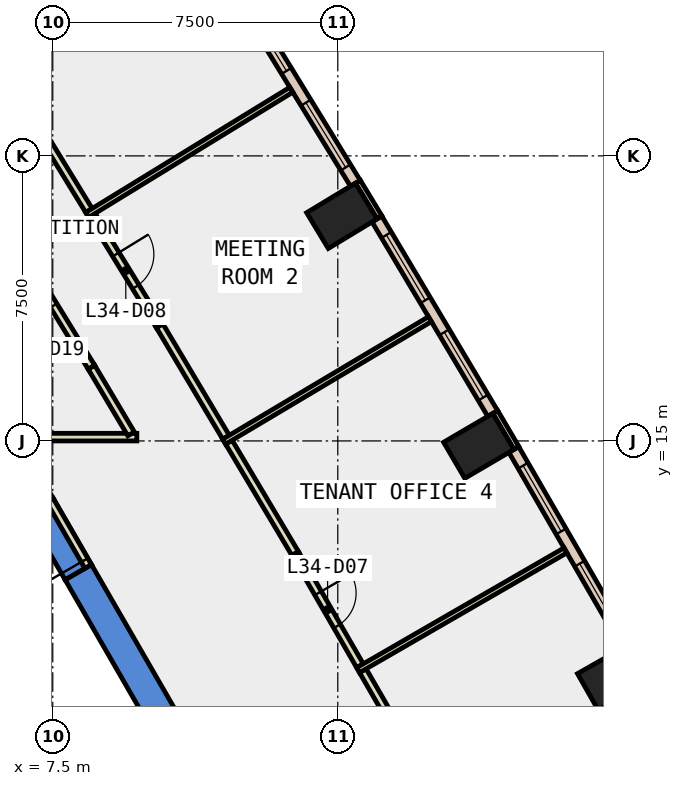
"""IFC4 building model, lengths in metres.
Left out: names, types, materials, properties, quantities, classifications, styles, units other than length and angle.
Written with IfcOpenShell. Run it as: python <this file> out.ifc"""

import sys

from ifc_helpers import new_model, si_unit, direction, frame, frame_2d, origin, origin_2d, place, context, subcontext, project, spatial, polyline, rectangle, outline, extrude, element, fill, save


model = new_model("IFC4")
c1 = context("Model", 3, precision=1e-05, world=origin(), true_north=direction((0.0, 1.0)))
c2 = subcontext(c1, "Body", "Model", "MODEL_VIEW")
j1 = project(units=[si_unit("LENGTHUNIT", "METRE"), si_unit("PLANEANGLEUNIT", "RADIAN")], contexts=[c1])
p1 = place(None, origin())
s1 = spatial("IfcSite", under=j1, at=p1, CompositionType="ELEMENT")
p2 = place(p1, origin())
s2 = spatial("IfcBuilding", under=s1, at=p2, CompositionType="ELEMENT")
p3 = place(p2, frame((0.0, 0.0, 155.0)))
s3 = spatial("IfcBuildingStorey", under=s2, at=p3, CompositionType="ELEMENT", Elevation=155.0)
for number, where, z_axis, x_axis in (
    (1, (22.232, 8.769, -0.4), (0.0, 0.0, 1.0), (-0.494, 0.869, 0.0)),
    (2, (18.71, 14.87, -0.4), (0.0, 0.0, 1.0), (-0.506, 0.863, 0.0)),
    (3, (15.107, 20.923, -0.4), (0.0, 0.0, 1.0), (-0.518, 0.855, 0.0)),
):
    element("IfcColumn", number, at=place(p3, frame(where, z_axis=z_axis, x_axis=x_axis)), inside=s3, PredefinedType="COLUMN", context=c2, shape_type="SweptSolid", body=[
        extrude(rectangle(XDim=1.1, YDim=1.5, at=origin_2d()), origin(), (0.0, 0.0, 1.0), 4.2),
    ])
p4 = place(p3, frame((0.0, 0.0, -0.4)))
e4 = element("IfcWall", 4, at=p4, inside=s3, PredefinedType="SHEAR", context=c2, shape_type="SweptSolid", body=[
    extrude(outline(polyline([(8.517, 11.748), (7.824, 11.348), (12.933, 2.5), (13.856, 2.5), (8.517, 11.748)])), origin(), (0.0, 0.0, 1.0), 4.2),
])
p5 = place(p3, frame((0.0, 0.0, -0.4)))
e5 = element("IfcWall", 5, at=p5, inside=s3, PredefinedType="SHEAR", context=c2, shape_type="SweptSolid", body=[
    extrude(outline(polyline([(6.824, 13.08), (7.517, 13.48), (6.928, 14.5), (6.466, 13.7), (6.824, 13.08)])), origin(), (0.0, 0.0, 1.0), 4.2),
])
p6 = place(p3, frame((0.0, 0.0, 3.6)))
e6 = element("IfcWall", 6, at=p6, inside=s3, PredefinedType="SHEAR", context=c2, shape_type="SweptSolid", body=[
    extrude(outline(polyline([(7.517, 13.48), (6.824, 13.08), (7.824, 11.348), (8.517, 11.748), (7.517, 13.48)])), origin(), (0.0, 0.0, 1.0), 0.2),
])
p7 = place(p3, frame((19.7, 14.813, 0.0), z_axis=(0.0, 0.0, 1.0), x_axis=(-0.506505715302, 0.862236603472, 0.0)))
e7 = element("IfcWall", 7, at=p7, inside=s3, PredefinedType="STANDARD", context=c2, shape_type="SweptSolid", body=[
    extrude(rectangle(XDim=1.099, YDim=0.15, at=frame_2d((0.55, 0.0))), origin(), (0.0, 0.0, 1.0), 3.8),
])
p8 = place(p3, frame((16.098, 20.88, 0.0), z_axis=(0.0, 0.0, 1.0), x_axis=(-0.517918067967, 0.85543022794, 0.0)))
e8 = element("IfcWall", 8, at=p8, inside=s3, PredefinedType="STANDARD", context=c2, shape_type="SweptSolid", body=[
    extrude(rectangle(XDim=1.1, YDim=0.15, at=frame_2d((0.55, 0.0))), origin(), (0.0, 0.0, 1.0), 3.8),
])
p9 = place(p3, frame((22.61, 9.615, 0.0), z_axis=(0.0, 0.0, 1.0), x_axis=(-0.500061823953, 0.865989706766, 0.0)))
e9 = element("IfcWall", 9, at=p9, inside=s3, PredefinedType="STANDARD", context=c2, shape_type="SweptSolid", body=[
    extrude(rectangle(XDim=5.957, YDim=0.3, at=frame_2d((2.979, 0.0))), origin(), (0.0, 0.0, 1.0), 3.8),
])
p10 = place(p9, frame((0.489, 0.0, 0.9)))
e10 = element("IfcOpeningElement", 10, at=p10, cuts=e9, PredefinedType="OPENING", context=c2, shape_type="SweptSolid", body=[
    extrude(rectangle(XDim=2.0, YDim=2.6, at=frame_2d((1.0, 1.3))), frame((0.0, 0.16, 0.0), z_axis=(0.0, -1.0, 0.0), x_axis=(1.0, 0.0, 0.0)), (0.0, 0.0, 1.0), 0.32),
])
p11 = place(p9, frame((3.468, 0.0, 0.9)))
e11 = element("IfcOpeningElement", 11, at=p11, cuts=e9, PredefinedType="OPENING", context=c2, shape_type="SweptSolid", body=[
    extrude(rectangle(XDim=2.0, YDim=2.6, at=frame_2d((1.0, 1.3))), frame((0.0, 0.16, 0.0), z_axis=(0.0, -1.0, 0.0), x_axis=(1.0, 0.0, 0.0)), (0.0, 0.0, 1.0), 0.32),
])
p12 = place(p3, frame((19.076, 15.721, 0.0), z_axis=(0.0, 0.0, 1.0), x_axis=(-0.511455040009, 0.859310038374, 0.0)))
e12 = element("IfcWall", 12, at=p12, inside=s3, PredefinedType="STANDARD", context=c2, shape_type="SweptSolid", body=[
    extrude(rectangle(XDim=5.957, YDim=0.3, at=frame_2d((2.979, 0.0))), origin(), (0.0, 0.0, 1.0), 3.8),
])
p13 = place(p12, frame((0.489, 0.0, 0.9)))
e13 = element("IfcOpeningElement", 13, at=p13, cuts=e12, PredefinedType="OPENING", context=c2, shape_type="SweptSolid", body=[
    extrude(rectangle(XDim=2.0, YDim=2.6, at=frame_2d((1.0, 1.3))), frame((0.0, 0.16, 0.0), z_axis=(0.0, -1.0, 0.0), x_axis=(1.0, 0.0, 0.0)), (0.0, 0.0, 1.0), 0.32),
])
p14 = place(p12, frame((3.468, 0.0, 0.9)))
e14 = element("IfcOpeningElement", 14, at=p14, cuts=e12, PredefinedType="OPENING", context=c2, shape_type="SweptSolid", body=[
    extrude(rectangle(XDim=2.0, YDim=2.6, at=frame_2d((1.0, 1.3))), frame((0.0, 0.16, 0.0), z_axis=(0.0, -1.0, 0.0), x_axis=(1.0, 0.0, 0.0)), (0.0, 0.0, 1.0), 0.32),
])
p15 = place(p3, frame((15.462, 21.779, 0.0), z_axis=(0.0, 0.0, 1.0), x_axis=(-0.522704272908, 0.852514072074, 0.0)))
e15 = element("IfcWall", 15, at=p15, inside=s3, PredefinedType="STANDARD", context=c2, shape_type="SweptSolid", body=[
    extrude(rectangle(XDim=5.958, YDim=0.3, at=frame_2d((2.979, 0.0))), origin(), (0.0, 0.0, 1.0), 3.8),
])
p16 = place(p15, frame((0.489, 0.0, 0.9)))
e16 = element("IfcOpeningElement", 16, at=p16, cuts=e15, PredefinedType="OPENING", context=c2, shape_type="SweptSolid", body=[
    extrude(rectangle(XDim=2.0, YDim=2.6, at=frame_2d((1.0, 1.3))), frame((0.0, 0.16, 0.0), z_axis=(0.0, -1.0, 0.0), x_axis=(1.0, 0.0, 0.0)), (0.0, 0.0, 1.0), 0.32),
])
p17 = place(p15, frame((3.468, 0.0, 0.9)))
e17 = element("IfcOpeningElement", 17, at=p17, cuts=e15, PredefinedType="OPENING", context=c2, shape_type="SweptSolid", body=[
    extrude(rectangle(XDim=2.0, YDim=2.6, at=frame_2d((1.0, 1.3))), frame((0.0, 0.16, 0.0), z_axis=(0.0, -1.0, 0.0), x_axis=(1.0, 0.0, 0.0)), (0.0, 0.0, 1.0), 0.32),
])
p18 = place(p3, frame((6.484, 15.1, 0.0), z_axis=(0.0, 0.0, 1.0), x_axis=(1.0, 0.0, 0.0)))
e18 = element("IfcWall", 18, at=p18, inside=s3, PredefinedType="PARTITIONING", context=c2, shape_type="SweptSolid", body=[
    extrude(rectangle(XDim=3.228, YDim=0.2, at=frame_2d((1.614, 0.0))), origin(), (0.0, 0.0, 1.0), 3.8),
])
p19 = place(p3, frame((9.561, 15.186, 0.0), z_axis=(0.0, 0.0, 1.0), x_axis=(-0.511399832047, 0.859342895346, 0.0)))
e19 = element("IfcWall", 19, at=p19, inside=s3, PredefinedType="PARTITIONING", context=c2, shape_type="SweptSolid", body=[
    extrude(rectangle(XDim=2.043, YDim=0.2, at=frame_2d((1.021, 0.0))), origin(), (0.0, 0.0, 1.0), 3.8),
])
p20 = place(p3, frame((8.516, 16.942, 0.0), z_axis=(0.0, 0.0, 1.0), x_axis=(-0.522865983217, 0.852414901086, 0.0)))
e20 = element("IfcWall", 20, at=p20, inside=s3, PredefinedType="PARTITIONING", context=c2, shape_type="SweptSolid", body=[
    extrude(rectangle(XDim=4.803, YDim=0.2, at=frame_2d((2.401, 0.0))), origin(), (0.0, 0.0, 1.0), 3.8),
])
p21 = place(p20, frame((1.901, 0.0, 0.0)))
e21 = element("IfcOpeningElement", 21, at=p21, cuts=e20, PredefinedType="OPENING", context=c2, shape_type="SweptSolid", body=[
    extrude(rectangle(XDim=1.0, YDim=2.1, at=frame_2d((0.5, 1.05))), frame((0.0, 0.11, 0.0), z_axis=(0.0, -1.0, 0.0), x_axis=(1.0, 0.0, 0.0)), (0.0, 0.0, 1.0), 0.22),
])
p22 = place(p3, frame((15.659, 8.954, 0.0), z_axis=(0.0, 0.0, 1.0), x_axis=(0.50001992892, -0.866013897511, 0.0)))
e22 = element("IfcWall", 22, at=p22, inside=s3, PredefinedType="PARTITIONING", context=c2, shape_type="SweptSolid", body=[
    extrude(rectangle(XDim=3.41, YDim=0.2, at=frame_2d((1.705, 0.0))), origin(), (0.0, 0.0, 1.0), 3.8),
])
p23 = place(p3, frame((12.134, 14.968, 0.0), z_axis=(0.0, 0.0, 1.0), x_axis=(0.511545516492, -0.859256180983, 0.0)))
e23 = element("IfcWall", 23, at=p23, inside=s3, PredefinedType="PARTITIONING", context=c2, shape_type="SweptSolid", body=[
    extrude(rectangle(XDim=3.411, YDim=0.2, at=frame_2d((1.706, 0.0))), origin(), (0.0, 0.0, 1.0), 3.8),
])
p24 = place(p3, frame((13.879, 12.037, 0.0), z_axis=(0.0, 0.0, 1.0), x_axis=(0.50001992892, -0.866013897511, 0.0)))
e24 = element("IfcWall", 24, at=p24, inside=s3, PredefinedType="PARTITIONING", context=c2, shape_type="SweptSolid", body=[
    extrude(rectangle(XDim=3.41, YDim=0.2, at=frame_2d((1.705, 0.0))), origin(), (0.0, 0.0, 1.0), 3.8),
])
p25 = place(p24, frame((1.205, 0.0, 0.0)))
e25 = element("IfcOpeningElement", 25, at=p25, cuts=e24, PredefinedType="OPENING", context=c2, shape_type="SweptSolid", body=[
    extrude(rectangle(XDim=1.0, YDim=2.1, at=frame_2d((0.5, 1.05))), frame((0.0, 0.11, 0.0), z_axis=(0.0, -1.0, 0.0), x_axis=(1.0, 0.0, 0.0)), (0.0, 0.0, 1.0), 0.22),
])
p26 = place(p3, frame((8.53, 20.935, 0.0), z_axis=(0.0, 0.0, 1.0), x_axis=(0.522830634433, -0.852436582801, 0.0)))
e26 = element("IfcWall", 26, at=p26, inside=s3, PredefinedType="PARTITIONING", context=c2, shape_type="SweptSolid", body=[
    extrude(rectangle(XDim=3.41, YDim=0.2, at=frame_2d((1.705, 0.0))), origin(), (0.0, 0.0, 1.0), 3.8),
])
p27 = place(p26, frame((1.205, 0.0, 0.0)))
e27 = element("IfcOpeningElement", 27, at=p27, cuts=e26, PredefinedType="OPENING", context=c2, shape_type="SweptSolid", body=[
    extrude(rectangle(XDim=1.0, YDim=2.1, at=frame_2d((0.5, 1.05))), frame((0.0, 0.11, 0.0), z_axis=(0.0, -1.0, 0.0), x_axis=(1.0, 0.0, 0.0)), (0.0, 0.0, 1.0), 0.22),
])
p28 = place(p3, frame((10.313, 18.028, 0.0), z_axis=(0.0, 0.0, 1.0), x_axis=(0.511566898838, -0.859243450958, 0.0)))
e28 = element("IfcWall", 28, at=p28, inside=s3, PredefinedType="PARTITIONING", context=c2, shape_type="SweptSolid", body=[
    extrude(rectangle(XDim=3.411, YDim=0.2, at=frame_2d((1.706, 0.0))), origin(), (0.0, 0.0, 1.0), 3.8),
])
p29 = place(p3, frame((6.67, 23.97, 0.0), z_axis=(0.0, 0.0, 1.0), x_axis=(0.522622501212, -0.85256420358, 0.0)))
e29 = element("IfcWall", 29, at=p29, inside=s3, PredefinedType="PARTITIONING", context=c2, shape_type="SweptSolid", body=[
    extrude(rectangle(XDim=3.41, YDim=0.2, at=frame_2d((1.705, 0.0))), origin(), (0.0, 0.0, 1.0), 3.8),
])
p30 = place(p3, frame((15.535, 8.969, 0.0), z_axis=(0.0, 0.0, 1.0), x_axis=(0.865951968193, 0.500127172609, 0.0)))
e30 = element("IfcWall", 30, at=p30, inside=s3, PredefinedType="PARTITIONING", context=c2, shape_type="SweptSolid", body=[
    extrude(rectangle(XDim=6.301, YDim=0.15, at=frame_2d((3.15, 0.0))), origin(), (0.0, 0.0, 1.0), 3.8),
])
for number, where, z_axis, x_axis in (
    (31, (12.01, 14.981, 0.0), (0.0, 0.0, 1.0), (0.859, 0.511, 0.0)),
    (32, (8.406, 20.947, 0.0), (0.0, 0.0, 1.0), (0.853, 0.523, 0.0)),
):
    element("IfcWall", number, at=place(p3, frame(where, z_axis=z_axis, x_axis=x_axis)), inside=s3, PredefinedType="PARTITIONING", context=c2, shape_type="SweptSolid", body=[
        extrude(rectangle(XDim=6.3, YDim=0.15, at=frame_2d((3.15, 0.0))), origin(), (0.0, 0.0, 1.0), 3.8),
    ])
p31 = place(p3, frame((8.43, 11.698, 0.0), z_axis=(0.0, 0.0, 1.0), x_axis=(-0.50002537861, 0.866010750942, 0.0)))
e33 = element("IfcWall", 33, at=p31, inside=s3, PredefinedType="PARTITIONING", context=c2, shape_type="SweptSolid", body=[
    extrude(rectangle(XDim=2.0, YDim=0.2, at=frame_2d((1.0, 0.0))), origin(), (0.0, 0.0, 1.0), 2.4),
])
p32 = place(p31, frame((0.19, 0.0, 0.0)))
e34 = element("IfcOpeningElement", 34, at=p32, cuts=e33, PredefinedType="OPENING", context=c2, shape_type="SweptSolid", body=[
    extrude(rectangle(XDim=1.8, YDim=2.1, at=frame_2d((0.9, 1.05))), frame((0.0, 0.11, 0.0), z_axis=(0.0, -1.0, 0.0), x_axis=(1.0, 0.0, 0.0)), (0.0, 0.0, 1.0), 0.22),
])
p33 = place(p3, frame((8.48, 3.412, 0.0), z_axis=(0.0, 0.0, 1.0), x_axis=(-0.499978703459, 0.866037698999, 0.0)))
e35 = element("IfcWall", 35, at=p33, inside=s3, PredefinedType="STANDARD", context=c2, shape_type="SweptSolid", body=[
    extrude(rectangle(XDim=6.9, YDim=0.2, at=frame_2d((3.45, 0.0))), origin(), (0.0, 0.0, 1.0), 3.8),
])
p34 = place(p10, origin())
e36 = element("IfcWindow", 36, at=p34, inside=s3, PartitioningType="SINGLE_PANEL", PredefinedType="WINDOW", context=c2, shape_type="SweptSolid", body=[
    extrude(rectangle(XDim=2.0, YDim=2.6, at=frame_2d((1.0, 1.3))), frame((0.0, 0.03, 0.0), z_axis=(0.0, -1.0, 0.0), x_axis=(1.0, 0.0, 0.0)), (0.0, 0.0, 1.0), 0.06),
])
fill(e10, e36)
p35 = place(p11, origin())
e37 = element("IfcWindow", 37, at=p35, inside=s3, PartitioningType="SINGLE_PANEL", PredefinedType="WINDOW", context=c2, shape_type="SweptSolid", body=[
    extrude(rectangle(XDim=2.0, YDim=2.6, at=frame_2d((1.0, 1.3))), frame((0.0, 0.03, 0.0), z_axis=(0.0, -1.0, 0.0), x_axis=(1.0, 0.0, 0.0)), (0.0, 0.0, 1.0), 0.06),
])
fill(e11, e37)
p36 = place(p13, origin())
e38 = element("IfcWindow", 38, at=p36, inside=s3, PartitioningType="SINGLE_PANEL", PredefinedType="WINDOW", context=c2, shape_type="SweptSolid", body=[
    extrude(rectangle(XDim=2.0, YDim=2.6, at=frame_2d((1.0, 1.3))), frame((0.0, 0.03, 0.0), z_axis=(0.0, -1.0, 0.0), x_axis=(1.0, 0.0, 0.0)), (0.0, 0.0, 1.0), 0.06),
])
fill(e13, e38)
p37 = place(p14, origin())
e39 = element("IfcWindow", 39, at=p37, inside=s3, PartitioningType="SINGLE_PANEL", PredefinedType="WINDOW", context=c2, shape_type="SweptSolid", body=[
    extrude(rectangle(XDim=2.0, YDim=2.6, at=frame_2d((1.0, 1.3))), frame((0.0, 0.03, 0.0), z_axis=(0.0, -1.0, 0.0), x_axis=(1.0, 0.0, 0.0)), (0.0, 0.0, 1.0), 0.06),
])
fill(e14, e39)
p38 = place(p16, origin())
e40 = element("IfcWindow", 40, at=p38, inside=s3, PartitioningType="SINGLE_PANEL", PredefinedType="WINDOW", context=c2, shape_type="SweptSolid", body=[
    extrude(rectangle(XDim=2.0, YDim=2.6, at=frame_2d((1.0, 1.3))), frame((0.0, 0.03, 0.0), z_axis=(0.0, -1.0, 0.0), x_axis=(1.0, 0.0, 0.0)), (0.0, 0.0, 1.0), 0.06),
])
fill(e16, e40)
p39 = place(p17, origin())
e41 = element("IfcWindow", 41, at=p39, inside=s3, PartitioningType="SINGLE_PANEL", PredefinedType="WINDOW", context=c2, shape_type="SweptSolid", body=[
    extrude(rectangle(XDim=2.0, YDim=2.6, at=frame_2d((1.0, 1.3))), frame((0.0, 0.03, 0.0), z_axis=(0.0, -1.0, 0.0), x_axis=(1.0, 0.0, 0.0)), (0.0, 0.0, 1.0), 0.06),
])
fill(e17, e41)
p40 = place(p25, origin())
e42 = element("IfcDoor", 42, at=p40, inside=s3, OperationType="SINGLE_SWING_LEFT", PredefinedType="DOOR", context=c2, shape_type="SweptSolid", body=[
    extrude(rectangle(XDim=1.0, YDim=2.1, at=frame_2d((0.5, 1.05))), frame((0.0, 0.025, 0.0), z_axis=(0.0, -1.0, 0.0), x_axis=(1.0, 0.0, 0.0)), (0.0, 0.0, 1.0), 0.05),
])
fill(e25, e42)
p41 = place(p27, origin())
e43 = element("IfcDoor", 43, at=p41, inside=s3, OperationType="SINGLE_SWING_LEFT", PredefinedType="DOOR", context=c2, shape_type="SweptSolid", body=[
    extrude(rectangle(XDim=1.0, YDim=2.1, at=frame_2d((0.5, 1.05))), frame((0.0, 0.025, 0.0), z_axis=(0.0, -1.0, 0.0), x_axis=(1.0, 0.0, 0.0)), (0.0, 0.0, 1.0), 0.05),
])
fill(e27, e43)
p42 = place(p21, origin())
e44 = element("IfcDoor", 44, at=p42, inside=s3, OperationType="SINGLE_SWING_LEFT", PredefinedType="DOOR", context=c2, shape_type="SweptSolid", body=[
    extrude(rectangle(XDim=1.0, YDim=2.1, at=frame_2d((0.5, 1.05))), frame((0.0, 0.025, 0.0), z_axis=(0.0, -1.0, 0.0), x_axis=(1.0, 0.0, 0.0)), (0.0, 0.0, 1.0), 0.05),
])
fill(e21, e44)
p43 = place(p32, origin())
e45 = element("IfcDoor", 45, at=p43, inside=s3, OperationType="DOUBLE_DOOR_SINGLE_SWING", PredefinedType="DOOR", context=c2, shape_type="SweptSolid", body=[
    extrude(rectangle(XDim=1.8, YDim=2.1, at=frame_2d((0.9, 1.05))), frame((0.0, 0.025, 0.0), z_axis=(0.0, -1.0, 0.0), x_axis=(1.0, 0.0, 0.0)), (0.0, 0.0, 1.0), 0.05),
])
fill(e34, e45)
save(model, sys.argv[1])
